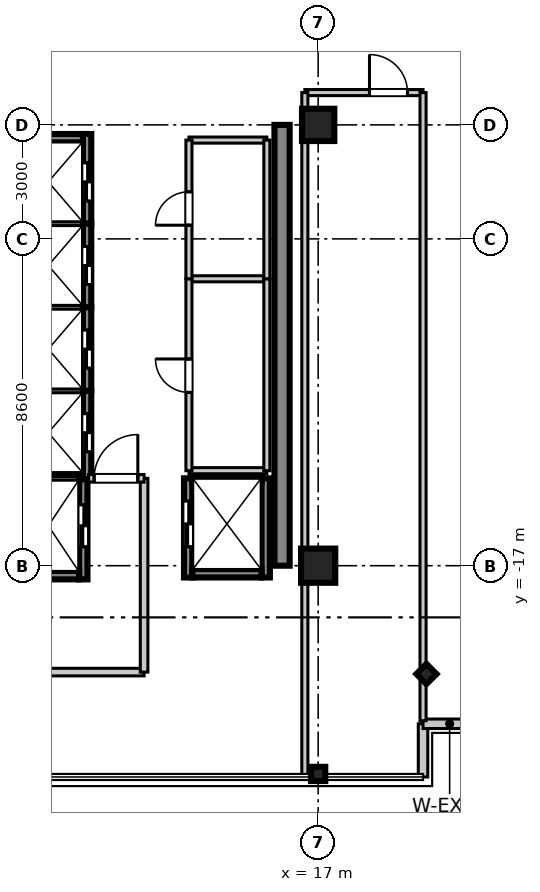
"""IFC4 building model, lengths in metres.
Left out: names, types, materials, properties, quantities, classifications, styles, units other than length and angle.
Written with IfcOpenShell. Run it as: python <this file> out.ifc"""

import sys

from ifc_helpers import new_model, si_unit, direction, frame, frame_2d, origin, origin_2d, place, context, subcontext, project, spatial, rectangle, i_section, extrude, source, transform, mapped, element, fill, save


model = new_model("IFC4")
c1 = context("Model", 3, precision=1e-05, world=origin(), true_north=direction((0.0, 1.0)))
c2 = subcontext(c1, "Body", "Model", "MODEL_VIEW")
j1 = project(units=[si_unit("LENGTHUNIT", "METRE"), si_unit("PLANEANGLEUNIT", "RADIAN")], contexts=[c1])
p1 = place(None, origin())
s1 = spatial("IfcSite", under=j1, at=p1, CompositionType="ELEMENT")
p2 = place(p1, origin())
s2 = spatial("IfcBuilding", under=s1, at=p2, CompositionType="ELEMENT")
p3 = place(p2, frame((0.0, 0.0, 327.15)))
s3 = spatial("IfcBuildingStorey", under=s2, at=p3, CompositionType="ELEMENT", Elevation=327.15)
m1 = source(origin(), c2, "Body", "SweptSolid", [
    extrude(rectangle(XDim=0.9, YDim=0.9, at=origin_2d()), origin(), (0.0, 0.0, 1.0), 3.755),
])
p4 = place(p3, frame((17.0, -17.0, 0.0), z_axis=(0.0, 0.0, 1.0), x_axis=(1.0, 0.0, 0.0)))
e1 = element("IfcColumn", 1, at=p4, inside=s3, PredefinedType="COLUMN", context=c2, shape_type="MappedRepresentation", body=[
    mapped(m1, transform((0.0, 0.0, 0.0), scale=1.0)),
])
m2 = source(origin(), c2, "Body", "SweptSolid", [
    extrude(rectangle(XDim=0.85, YDim=0.85, at=origin_2d()), origin(), (0.0, 0.0, 1.0), 3.755),
])
p5 = place(p3, frame((17.0, -5.4, 0.0), z_axis=(0.0, 0.0, 1.0), x_axis=(1.0, 0.0, 0.0)))
e2 = element("IfcColumn", 2, at=p5, inside=s3, PredefinedType="PILASTER", context=c2, shape_type="MappedRepresentation", body=[
    mapped(m2, transform((0.0, 0.0, 0.0), scale=1.0)),
])
m3 = source(origin(), c2, "Body", "SweptSolid", [
    extrude(i_section(OverallWidth=0.374, OverallDepth=0.374, WebThickness=0.014, FlangeThickness=0.023, at=origin_2d()), origin(), (0.0, 0.0, 1.0), 3.755),
])
for number, where, z_axis, x_axis in (
    (3, (17.0, -22.48, 0.0), (0.0, 0.0, 1.0), (0.0, 1.0, 0.0)),
    (4, (19.85, -19.85, 0.0), (0.0, 0.0, 1.0), (0.707, 0.707, 0.0)),
):
    element("IfcColumn", number, at=place(p3, frame(where, z_axis=z_axis, x_axis=x_axis)), inside=s3, PredefinedType="COLUMN", context=c2, shape_type="MappedRepresentation", body=[
        mapped(m3, transform((0.0, 0.0, 0.0), scale=1.0)),
    ])
m4 = source(origin(), c2, "Body", "SweptSolid", [
    extrude(rectangle(XDim=11.6, YDim=0.4, at=frame_2d((5.8, 0.0))), origin(), (0.0, 0.0, 1.0), 3.5),
])
p6 = place(p3, frame((16.05, -17.0, 0.0), z_axis=(0.0, 0.0, 1.0), x_axis=(0.0, 1.0, 0.0)))
e5 = element("IfcWall", 5, at=p6, inside=s3, PredefinedType="SHEAR", context=c2, shape_type="MappedRepresentation", body=[
    mapped(m4, transform((0.0, 0.0, 0.0), scale=1.0)),
])
m5 = source(origin(), c2, "Body", "SweptSolid", [
    extrude(rectangle(XDim=2.36, YDim=0.22, at=frame_2d((1.18, 0.0))), origin(), (0.0, 0.0, 1.0), 3.5),
])
p7 = place(p3, frame((10.92, -8.0, 0.0), z_axis=(0.0, 0.0, 1.0), x_axis=(0.0, 1.0, 0.0)))
e6 = element("IfcWall", 6, at=p7, inside=s3, PredefinedType="SHEAR", context=c2, shape_type="MappedRepresentation", body=[
    mapped(m5, transform((0.0, 0.0, 0.0), scale=1.0)),
])
p8 = place(p7, frame((0.6, 0.0, 0.0)))
e7 = element("IfcOpeningElement", 7, at=p8, cuts=e6, PredefinedType="OPENING", context=c2, shape_type="SweptSolid", body=[
    extrude(rectangle(XDim=1.0, YDim=2.2, at=frame_2d((0.5, 1.1))), frame((0.0, 0.12, 0.0), z_axis=(0.0, -1.0, 0.0), x_axis=(1.0, 0.0, 0.0)), (0.0, 0.0, 1.0), 0.24),
])
m6 = source(origin(), c2, "Body", "SweptSolid", [
    extrude(rectangle(XDim=1.82, YDim=0.22, at=frame_2d((0.91, 0.0))), origin(), (0.0, 0.0, 1.0), 3.5),
])
p9 = place(p3, frame((8.99, -5.75, 0.0), z_axis=(0.0, 0.0, 1.0), x_axis=(1.0, 0.0, 0.0)))
e8 = element("IfcWall", 8, at=p9, inside=s3, PredefinedType="SHEAR", context=c2, shape_type="MappedRepresentation", body=[
    mapped(m6, transform((0.0, 0.0, 0.0), scale=1.0)),
])
m7 = source(origin(), c2, "Body", "SweptSolid", [
    extrude(rectangle(XDim=2.2, YDim=0.22, at=frame_2d((1.1, 0.0))), origin(), (0.0, 0.0, 1.0), 3.5),
])
p10 = place(p3, frame((10.92, -10.2, 0.0), z_axis=(0.0, 0.0, 1.0), x_axis=(0.0, 1.0, 0.0)))
e9 = element("IfcWall", 9, at=p10, inside=s3, PredefinedType="SHEAR", context=c2, shape_type="MappedRepresentation", body=[
    mapped(m7, transform((0.0, 0.0, 0.0), scale=1.0)),
])
p11 = place(p10, frame((0.6, 0.0, 0.0)))
e10 = element("IfcOpeningElement", 10, at=p11, cuts=e9, PredefinedType="OPENING", context=c2, shape_type="SweptSolid", body=[
    extrude(rectangle(XDim=1.0, YDim=2.2, at=frame_2d((0.5, 1.1))), frame((0.0, 0.12, 0.0), z_axis=(0.0, -1.0, 0.0), x_axis=(1.0, 0.0, 0.0)), (0.0, 0.0, 1.0), 0.24),
])
m8 = source(origin(), c2, "Body", "SweptSolid", [
    extrude(rectangle(XDim=1.82, YDim=0.22, at=frame_2d((0.91, 0.0))), origin(), (0.0, 0.0, 1.0), 3.8),
])
p12 = place(p3, frame((8.99, -8.0, 0.0), z_axis=(0.0, 0.0, 1.0), x_axis=(1.0, 0.0, 0.0)))
e11 = element("IfcWall", 11, at=p12, inside=s3, PredefinedType="SHEAR", context=c2, shape_type="MappedRepresentation", body=[
    mapped(m8, transform((0.0, 0.0, 0.0), scale=1.0)),
])
p13 = place(p3, frame((10.92, -12.4, 0.0), z_axis=(0.0, 0.0, 1.0), x_axis=(0.0, 1.0, 0.0)))
e12 = element("IfcWall", 12, at=p13, inside=s3, PredefinedType="SHEAR", context=c2, shape_type="MappedRepresentation", body=[
    mapped(m7, transform((0.0, 0.0, 0.0), scale=1.0)),
])
p14 = place(p13, frame((0.6, 0.0, 0.0)))
e13 = element("IfcOpeningElement", 13, at=p14, cuts=e12, PredefinedType="OPENING", context=c2, shape_type="SweptSolid", body=[
    extrude(rectangle(XDim=1.0, YDim=2.2, at=frame_2d((0.5, 1.1))), frame((0.0, 0.12, 0.0), z_axis=(0.0, -1.0, 0.0), x_axis=(1.0, 0.0, 0.0)), (0.0, 0.0, 1.0), 0.24),
])
p15 = place(p3, frame((8.99, -10.2, 0.0), z_axis=(0.0, 0.0, 1.0), x_axis=(1.0, 0.0, 0.0)))
e14 = element("IfcWall", 14, at=p15, inside=s3, PredefinedType="SHEAR", context=c2, shape_type="MappedRepresentation", body=[
    mapped(m8, transform((0.0, 0.0, 0.0), scale=1.0)),
])
m9 = source(origin(), c2, "Body", "SweptSolid", [
    extrude(rectangle(XDim=2.325, YDim=0.22, at=frame_2d((1.163, 0.0))), origin(), (0.0, 0.0, 1.0), 3.5),
])
p16 = place(p3, frame((10.92, -14.725, 0.0), z_axis=(0.0, 0.0, 1.0), x_axis=(0.0, 1.0, 0.0)))
e15 = element("IfcWall", 15, at=p16, inside=s3, PredefinedType="SHEAR", context=c2, shape_type="MappedRepresentation", body=[
    mapped(m9, transform((0.0, 0.0, 0.0), scale=1.0)),
])
p17 = place(p16, frame((0.725, 0.0, 0.0)))
e16 = element("IfcOpeningElement", 16, at=p17, cuts=e15, PredefinedType="OPENING", context=c2, shape_type="SweptSolid", body=[
    extrude(rectangle(XDim=1.0, YDim=2.2, at=frame_2d((0.5, 1.1))), frame((0.0, 0.12, 0.0), z_axis=(0.0, -1.0, 0.0), x_axis=(1.0, 0.0, 0.0)), (0.0, 0.0, 1.0), 0.24),
])
p18 = place(p3, frame((8.99, -12.4, 0.0), z_axis=(0.0, 0.0, 1.0), x_axis=(1.0, 0.0, 0.0)))
e17 = element("IfcWall", 17, at=p18, inside=s3, PredefinedType="SHEAR", context=c2, shape_type="MappedRepresentation", body=[
    mapped(m8, transform((0.0, 0.0, 0.0), scale=1.0)),
])
m10 = source(origin(), c2, "Body", "SweptSolid", [
    extrude(rectangle(XDim=2.635, YDim=0.22, at=frame_2d((1.317, 0.0))), origin(), (0.0, 0.0, 1.0), 3.5),
])
p19 = place(p3, frame((10.82, -17.36, 0.0), z_axis=(0.0, 0.0, 1.0), x_axis=(0.0, 1.0, 0.0)))
e18 = element("IfcWall", 18, at=p19, inside=s3, PredefinedType="SHEAR", context=c2, shape_type="MappedRepresentation", body=[
    mapped(m10, transform((0.0, 0.0, 0.0), scale=1.0)),
])
p20 = place(p19, frame((0.86, 0.0, 0.0)))
e19 = element("IfcOpeningElement", 19, at=p20, cuts=e18, PredefinedType="OPENING", context=c2, shape_type="SweptSolid", body=[
    extrude(rectangle(XDim=1.1, YDim=2.2, at=frame_2d((0.55, 1.1))), frame((0.0, 0.12, 0.0), z_axis=(0.0, -1.0, 0.0), x_axis=(1.0, 0.0, 0.0)), (0.0, 0.0, 1.0), 0.24),
])
m11 = source(origin(), c2, "Body", "SweptSolid", [
    extrude(rectangle(XDim=1.62, YDim=0.22, at=frame_2d((0.81, 0.0))), origin(), (0.0, 0.0, 1.0), 3.5),
])
p21 = place(p3, frame((9.09, -17.25, 0.0), z_axis=(0.0, 0.0, 1.0), x_axis=(1.0, 0.0, 0.0)))
e20 = element("IfcWall", 20, at=p21, inside=s3, PredefinedType="SHEAR", context=c2, shape_type="MappedRepresentation", body=[
    mapped(m11, transform((0.0, 0.0, 0.0), scale=1.0)),
])
m12 = source(origin(), c2, "Body", "SweptSolid", [
    extrude(rectangle(XDim=1.62, YDim=0.22, at=frame_2d((0.81, 0.0))), origin(), (0.0, 0.0, 1.0), 3.8),
])
p22 = place(p3, frame((9.09, -14.725, 0.0), z_axis=(0.0, 0.0, 1.0), x_axis=(1.0, 0.0, 0.0)))
e21 = element("IfcWall", 21, at=p22, inside=s3, PredefinedType="SHEAR", context=c2, shape_type="MappedRepresentation", body=[
    mapped(m12, transform((0.0, 0.0, 0.0), scale=1.0)),
])
m13 = source(origin(), c2, "Body", "SweptSolid", [
    extrude(rectangle(XDim=2.61, YDim=0.22, at=frame_2d((1.305, 0.0))), origin(), (0.0, 0.0, 1.0), 3.5),
])
p23 = place(p3, frame((13.58, -17.31, 0.0), z_axis=(0.0, 0.0, 1.0), x_axis=(0.0, 1.0, 0.0)))
e22 = element("IfcWall", 22, at=p23, inside=s3, PredefinedType="SHEAR", context=c2, shape_type="MappedRepresentation", body=[
    mapped(m13, transform((0.0, 0.0, 0.0), scale=1.0)),
])
p24 = place(p23, frame((0.81, 0.0, 0.0)))
e23 = element("IfcOpeningElement", 23, at=p24, cuts=e22, PredefinedType="OPENING", context=c2, shape_type="SweptSolid", body=[
    extrude(rectangle(XDim=1.2, YDim=2.2, at=frame_2d((0.6, 1.1))), frame((0.0, 0.12, 0.0), z_axis=(0.0, -1.0, 0.0), x_axis=(1.0, 0.0, 0.0)), (0.0, 0.0, 1.0), 0.24),
])
p25 = place(p3, frame((15.62, -17.31, 0.0), z_axis=(0.0, 0.0, 1.0), x_axis=(0.0, 1.0, 0.0)))
e24 = element("IfcWall", 24, at=p25, inside=s3, PredefinedType="SHEAR", context=c2, shape_type="MappedRepresentation", body=[
    mapped(m13, transform((0.0, 0.0, 0.0), scale=1.0)),
])
p26 = place(p3, frame((13.69, -17.2, 0.0), z_axis=(0.0, 0.0, 1.0), x_axis=(1.0, 0.0, 0.0)))
e25 = element("IfcWall", 25, at=p26, inside=s3, PredefinedType="SHEAR", context=c2, shape_type="MappedRepresentation", body=[
    mapped(m6, transform((0.0, 0.0, 0.0), scale=1.0)),
])
p27 = place(p3, frame((13.69, -14.7, 0.0), z_axis=(0.0, 0.0, 1.0), x_axis=(1.0, 0.0, 0.0)))
e26 = element("IfcWall", 26, at=p27, inside=s3, PredefinedType="SHEAR", context=c2, shape_type="MappedRepresentation", body=[
    mapped(m8, transform((0.0, 0.0, 0.0), scale=1.0)),
])
m14 = source(origin(), c2, "Body", "SweptSolid", [
    extrude(rectangle(XDim=1.4, YDim=0.25, at=frame_2d((0.7, 0.0))), origin(), (0.0, 0.0, 1.0), 3.5),
])
p28 = place(p3, frame((19.76, -22.56, 0.0), z_axis=(0.0, 0.0, 1.0), x_axis=(0.0, 1.0, 0.0)))
e27 = element("IfcWall", 27, at=p28, inside=s3, PredefinedType="STANDARD", context=c2, shape_type="MappedRepresentation", body=[
    mapped(m14, transform((0.0, 0.0, 0.0), scale=1.0)),
])
m15 = source(origin(), c2, "Body", "SweptSolid", [
    extrude(rectangle(XDim=1.4, YDim=0.25, at=frame_2d((0.7, 0.0))), origin(), (0.0, 0.0, 1.0), 3.5),
])
p29 = place(p3, frame((19.76, -21.16, 0.0), z_axis=(0.0, 0.0, 1.0), x_axis=(1.0, 0.0, 0.0)))
e28 = element("IfcWall", 28, at=p29, inside=s3, PredefinedType="STANDARD", context=c2, shape_type="MappedRepresentation", body=[
    mapped(m15, transform((0.0, 0.0, 0.0), scale=1.0)),
])
m16 = source(origin(), c2, "Body", "SweptSolid", [
    extrude(rectangle(XDim=5.82, YDim=0.2, at=frame_2d((2.91, 0.0))), origin(), (0.0, 0.0, 1.0), 2.84),
])
p30 = place(p3, frame((6.6, -19.8, 0.0), z_axis=(0.0, 0.0, 1.0), x_axis=(1.0, 0.0, 0.0)))
e29 = element("IfcWall", 29, at=p30, inside=s3, PredefinedType="PARTITIONING", context=c2, shape_type="MappedRepresentation", body=[
    mapped(m16, transform((0.0, 0.0, 0.0), scale=1.0)),
])
m17 = source(origin(), c2, "Body", "SweptSolid", [
    extrude(rectangle(XDim=5.1, YDim=0.2, at=frame_2d((2.55, 0.0))), origin(), (0.0, 0.0, 1.0), 2.84),
])
p31 = place(p3, frame((12.42, -19.8, 0.0), z_axis=(0.0, 0.0, 1.0), x_axis=(0.0, 1.0, 0.0)))
e30 = element("IfcWall", 30, at=p31, inside=s3, PredefinedType="PARTITIONING", context=c2, shape_type="MappedRepresentation", body=[
    mapped(m17, transform((0.0, 0.0, 0.0), scale=1.0)),
])
m18 = source(origin(), c2, "Body", "SweptSolid", [
    extrude(rectangle(XDim=1.46, YDim=0.2, at=frame_2d((0.73, 0.0))), origin(), (0.0, 0.0, 1.0), 2.84),
])
p32 = place(p3, frame((10.96, -14.7, 0.0), z_axis=(0.0, 0.0, 1.0), x_axis=(1.0, 0.0, 0.0)))
e31 = element("IfcWall", 31, at=p32, inside=s3, PredefinedType="PARTITIONING", context=c2, shape_type="MappedRepresentation", body=[
    mapped(m18, transform((0.0, 0.0, 0.0), scale=1.0)),
])
p33 = place(p32, frame((0.145, 0.0, 0.0)))
e32 = element("IfcOpeningElement", 32, at=p33, cuts=e31, PredefinedType="OPENING", context=c2, shape_type="SweptSolid", body=[
    extrude(rectangle(XDim=1.15, YDim=2.15, at=frame_2d((0.575, 1.075))), frame((0.0, 0.11, 0.0), z_axis=(0.0, -1.0, 0.0), x_axis=(1.0, 0.0, 0.0)), (0.0, 0.0, 1.0), 0.22),
])
m19 = source(origin(), c2, "Body", "SweptSolid", [
    extrude(rectangle(XDim=2.05, YDim=0.16, at=frame_2d((1.025, 0.0))), origin(), (0.0, 0.0, 1.0), 2.84),
])
for number, where, z_axis, x_axis in (
    (33, (13.6, -14.5, 0.0), (0.0, 0.0, 1.0), (1.0, 0.0, 0.0)),
    (34, (13.6, -9.45, 0.0), (0.0, 0.0, 1.0), (1.0, 0.0, 0.0)),
):
    element("IfcWall", number, at=place(p3, frame(where, z_axis=z_axis, x_axis=x_axis)), inside=s3, PredefinedType="PARTITIONING", context=c2, shape_type="MappedRepresentation", body=[
        mapped(m19, transform((0.0, 0.0, 0.0), scale=1.0)),
    ])
m20 = source(origin(), c2, "Body", "SweptSolid", [
    extrude(rectangle(XDim=5.05, YDim=0.16, at=frame_2d((2.525, 0.0))), origin(), (0.0, 0.0, 1.0), 2.84),
])
p34 = place(p3, frame((13.6, -14.5, 0.0), z_axis=(0.0, 0.0, 1.0), x_axis=(0.0, 1.0, 0.0)))
e35 = element("IfcWall", 35, at=p34, inside=s3, PredefinedType="PARTITIONING", context=c2, shape_type="MappedRepresentation", body=[
    mapped(m20, transform((0.0, 0.0, 0.0), scale=1.0)),
])
p35 = place(p34, frame((2.06, 0.0, 0.0)))
e36 = element("IfcOpeningElement", 36, at=p35, cuts=e35, PredefinedType="OPENING", context=c2, shape_type="SweptSolid", body=[
    extrude(rectangle(XDim=0.88, YDim=2.1, at=frame_2d((0.44, 1.05))), frame((0.0, 0.09, 0.0), z_axis=(0.0, -1.0, 0.0), x_axis=(1.0, 0.0, 0.0)), (0.0, 0.0, 1.0), 0.18),
])
p36 = place(p3, frame((15.65, -14.5, 0.0), z_axis=(0.0, 0.0, 1.0), x_axis=(0.0, 1.0, 0.0)))
e37 = element("IfcWall", 37, at=p36, inside=s3, PredefinedType="PARTITIONING", context=c2, shape_type="MappedRepresentation", body=[
    mapped(m20, transform((0.0, 0.0, 0.0), scale=1.0)),
])
p37 = place(p3, frame((13.6, -5.8, 0.0), z_axis=(0.0, 0.0, 1.0), x_axis=(1.0, 0.0, 0.0)))
e38 = element("IfcWall", 38, at=p37, inside=s3, PredefinedType="PARTITIONING", context=c2, shape_type="MappedRepresentation", body=[
    mapped(m19, transform((0.0, 0.0, 0.0), scale=1.0)),
])
m21 = source(origin(), c2, "Body", "SweptSolid", [
    extrude(rectangle(XDim=3.65, YDim=0.16, at=frame_2d((1.825, 0.0))), origin(), (0.0, 0.0, 1.0), 2.84),
])
p38 = place(p3, frame((13.6, -9.45, 0.0), z_axis=(0.0, 0.0, 1.0), x_axis=(0.0, 1.0, 0.0)))
e39 = element("IfcWall", 39, at=p38, inside=s3, PredefinedType="PARTITIONING", context=c2, shape_type="MappedRepresentation", body=[
    mapped(m21, transform((0.0, 0.0, 0.0), scale=1.0)),
])
p39 = place(p38, frame((1.41, 0.0, 0.0)))
e40 = element("IfcOpeningElement", 40, at=p39, cuts=e39, PredefinedType="OPENING", context=c2, shape_type="SweptSolid", body=[
    extrude(rectangle(XDim=0.88, YDim=2.1, at=frame_2d((0.44, 1.05))), frame((0.0, 0.09, 0.0), z_axis=(0.0, -1.0, 0.0), x_axis=(1.0, 0.0, 0.0)), (0.0, 0.0, 1.0), 0.18),
])
p40 = place(p3, frame((15.65, -9.45, 0.0), z_axis=(0.0, 0.0, 1.0), x_axis=(0.0, 1.0, 0.0)))
e41 = element("IfcWall", 41, at=p40, inside=s3, PredefinedType="PARTITIONING", context=c2, shape_type="MappedRepresentation", body=[
    mapped(m21, transform((0.0, 0.0, 0.0), scale=1.0)),
])
m22 = source(origin(), c2, "Body", "SweptSolid", [
    extrude(rectangle(XDim=3.11, YDim=0.16, at=frame_2d((1.555, 0.0))), origin(), (0.0, 0.0, 1.0), 2.84),
])
p41 = place(p3, frame((16.65, -4.55, 0.0), z_axis=(0.0, 0.0, 1.0), x_axis=(1.0, 0.0, 0.0)))
e42 = element("IfcWall", 42, at=p41, inside=s3, PredefinedType="PARTITIONING", context=c2, shape_type="MappedRepresentation", body=[
    mapped(m22, transform((0.0, 0.0, 0.0), scale=1.0)),
])
p42 = place(p41, frame((1.701, 0.0, 0.0)))
e43 = element("IfcOpeningElement", 43, at=p42, cuts=e42, PredefinedType="OPENING", context=c2, shape_type="SweptSolid", body=[
    extrude(rectangle(XDim=1.0, YDim=2.1, at=frame_2d((0.5, 1.05))), frame((0.0, 0.09, 0.0), z_axis=(0.0, -1.0, 0.0), x_axis=(1.0, 0.0, 0.0)), (0.0, 0.0, 1.0), 0.18),
])
m23 = source(origin(), c2, "Body", "SweptSolid", [
    extrude(rectangle(XDim=17.95, YDim=0.16, at=frame_2d((8.975, 0.0))), origin(), (0.0, 0.0, 1.0), 2.84),
])
p43 = place(p3, frame((16.65, -22.5, 0.0), z_axis=(0.0, 0.0, 1.0), x_axis=(0.0, 1.0, 0.0)))
e44 = element("IfcWall", 44, at=p43, inside=s3, PredefinedType="PARTITIONING", context=c2, shape_type="MappedRepresentation", body=[
    mapped(m23, transform((0.0, 0.0, 0.0), scale=1.0)),
])
m24 = source(origin(), c2, "Body", "SweptSolid", [
    extrude(rectangle(XDim=16.53, YDim=0.16, at=frame_2d((8.265, 0.0))), origin(), (0.0, 0.0, 1.0), 2.84),
])
p44 = place(p3, frame((19.76, -21.08, 0.0), z_axis=(0.0, 0.0, 1.0), x_axis=(0.0, 1.0, 0.0)))
e45 = element("IfcWall", 45, at=p44, inside=s3, PredefinedType="PARTITIONING", context=c2, shape_type="MappedRepresentation", body=[
    mapped(m24, transform((0.0, 0.0, 0.0), scale=1.0)),
])
m25 = source(origin(), c2, "Body", "SweptSolid", [
    extrude(rectangle(XDim=1.0, YDim=2.2, at=frame_2d((0.5, 1.1))), frame((0.0, 0.025, 0.0), z_axis=(0.0, -1.0, 0.0), x_axis=(1.0, 0.0, 0.0)), (0.0, 0.0, 1.0), 0.05),
])
p45 = place(p8, frame((1.0, 0.0, 0.0), z_axis=(0.0, 0.0, 1.0), x_axis=(-1.0, 0.0, 0.0)))
e46 = element("IfcDoor", 46, at=p45, inside=s3, OperationType="DOUBLE_DOOR_SLIDING", PredefinedType="DOOR", context=c2, shape_type="MappedRepresentation", body=[
    mapped(m25, transform((0.0, 0.0, 0.0), scale=1.0)),
])
fill(e7, e46)
p46 = place(p11, frame((1.0, 0.0, 0.0), z_axis=(0.0, 0.0, 1.0), x_axis=(-1.0, 0.0, 0.0)))
e47 = element("IfcDoor", 47, at=p46, inside=s3, OperationType="DOUBLE_DOOR_SLIDING", PredefinedType="DOOR", context=c2, shape_type="MappedRepresentation", body=[
    mapped(m25, transform((0.0, 0.0, 0.0), scale=1.0)),
])
fill(e10, e47)
p47 = place(p14, frame((1.0, 0.0, 0.0), z_axis=(0.0, 0.0, 1.0), x_axis=(-1.0, 0.0, 0.0)))
e48 = element("IfcDoor", 48, at=p47, inside=s3, OperationType="DOUBLE_DOOR_SLIDING", PredefinedType="DOOR", context=c2, shape_type="MappedRepresentation", body=[
    mapped(m25, transform((0.0, 0.0, 0.0), scale=1.0)),
])
fill(e13, e48)
p48 = place(p17, frame((1.0, 0.0, 0.0), z_axis=(0.0, 0.0, 1.0), x_axis=(-1.0, 0.0, 0.0)))
e49 = element("IfcDoor", 49, at=p48, inside=s3, OperationType="DOUBLE_DOOR_SLIDING", PredefinedType="DOOR", context=c2, shape_type="MappedRepresentation", body=[
    mapped(m25, transform((0.0, 0.0, 0.0), scale=1.0)),
])
fill(e16, e49)
m26 = source(origin(), c2, "Body", "SweptSolid", [
    extrude(rectangle(XDim=1.1, YDim=2.2, at=frame_2d((0.55, 1.1))), frame((0.0, 0.025, 0.0), z_axis=(0.0, -1.0, 0.0), x_axis=(1.0, 0.0, 0.0)), (0.0, 0.0, 1.0), 0.05),
])
p49 = place(p20, frame((1.1, 0.0, 0.0), z_axis=(0.0, 0.0, 1.0), x_axis=(-1.0, 0.0, 0.0)))
e50 = element("IfcDoor", 50, at=p49, inside=s3, OperationType="DOUBLE_DOOR_SLIDING", PredefinedType="DOOR", context=c2, shape_type="MappedRepresentation", body=[
    mapped(m26, transform((0.0, 0.0, 0.0), scale=1.0)),
])
fill(e19, e50)
m27 = source(origin(), c2, "Body", "SweptSolid", [
    extrude(rectangle(XDim=1.2, YDim=2.2, at=frame_2d((0.6, 1.1))), frame((0.0, 0.025, 0.0), z_axis=(0.0, -1.0, 0.0), x_axis=(1.0, 0.0, 0.0)), (0.0, 0.0, 1.0), 0.05),
])
p50 = place(p24, origin())
e51 = element("IfcDoor", 51, at=p50, inside=s3, OperationType="DOUBLE_DOOR_SLIDING", PredefinedType="DOOR", context=c2, shape_type="MappedRepresentation", body=[
    mapped(m27, transform((0.0, 0.0, 0.0), scale=1.0)),
])
fill(e23, e51)
m28 = source(origin(), c2, "Body", "SweptSolid", [
    extrude(rectangle(XDim=1.15, YDim=2.15, at=frame_2d((0.575, 1.075))), frame((0.0, 0.025, 0.0), z_axis=(0.0, -1.0, 0.0), x_axis=(1.0, 0.0, 0.0)), (0.0, 0.0, 1.0), 0.05),
])
p51 = place(p33, origin())
e52 = element("IfcDoor", 52, at=p51, inside=s3, OperationType="SINGLE_SWING_RIGHT", PredefinedType="DOOR", context=c2, shape_type="MappedRepresentation", body=[
    mapped(m28, transform((0.0, 0.0, 0.0), scale=1.0)),
])
fill(e32, e52)
m29 = source(origin(), c2, "Body", "SweptSolid", [
    extrude(rectangle(XDim=0.88, YDim=2.1, at=frame_2d((0.44, 1.05))), frame((0.0, 0.025, 0.0), z_axis=(0.0, -1.0, 0.0), x_axis=(1.0, 0.0, 0.0)), (0.0, 0.0, 1.0), 0.05),
])
p52 = place(p35, frame((0.88, 0.0, 0.0), z_axis=(0.0, 0.0, 1.0), x_axis=(-1.0, 0.0, 0.0)))
e53 = element("IfcDoor", 53, at=p52, inside=s3, OperationType="SINGLE_SWING_RIGHT", PredefinedType="DOOR", context=c2, shape_type="MappedRepresentation", body=[
    mapped(m29, transform((0.0, 0.0, 0.0), scale=1.0)),
])
fill(e36, e53)
p53 = place(p39, frame((0.88, 0.0, 0.0), z_axis=(0.0, 0.0, 1.0), x_axis=(-1.0, 0.0, 0.0)))
e54 = element("IfcDoor", 54, at=p53, inside=s3, OperationType="SINGLE_SWING_LEFT", PredefinedType="DOOR", context=c2, shape_type="MappedRepresentation", body=[
    mapped(m29, transform((0.0, 0.0, 0.0), scale=1.0)),
])
fill(e40, e54)
m30 = source(origin(), c2, "Body", "SweptSolid", [
    extrude(rectangle(XDim=1.0, YDim=2.1, at=frame_2d((0.5, 1.05))), frame((0.0, 0.025, 0.0), z_axis=(0.0, -1.0, 0.0), x_axis=(1.0, 0.0, 0.0)), (0.0, 0.0, 1.0), 0.05),
])
p54 = place(p42, frame((1.0, 0.0, 0.0), z_axis=(0.0, 0.0, 1.0), x_axis=(-1.0, 0.0, 0.0)))
e55 = element("IfcDoor", 55, at=p54, inside=s3, OperationType="SINGLE_SWING_LEFT", PredefinedType="DOOR", context=c2, shape_type="MappedRepresentation", body=[
    mapped(m30, transform((0.0, 0.0, 0.0), scale=1.0)),
])
fill(e43, e55)
save(model, sys.argv[1])
